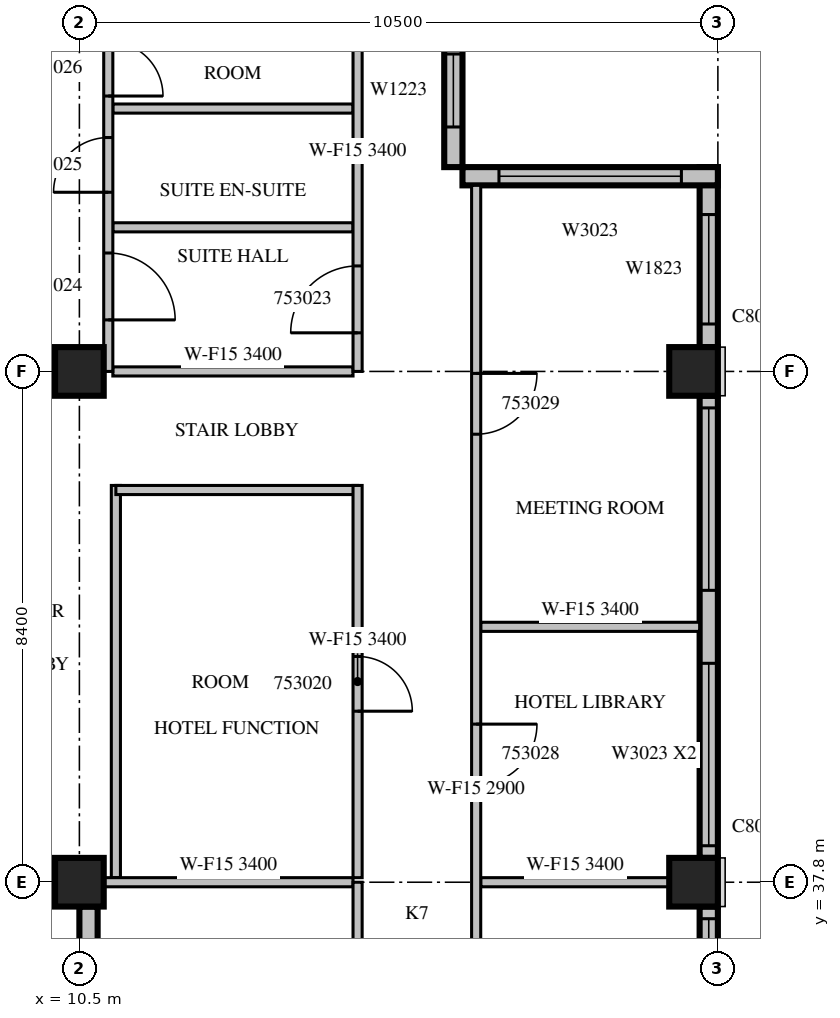
"""IFC4 building model, lengths in metres.
Left out: names, types, materials, properties, quantities, classifications, styles, units other than length and angle.
Written with IfcOpenShell. Run it as: python <this file> out.ifc"""

import sys

from ifc_helpers import new_model, si_unit, direction, frame, frame_2d, origin, origin_2d, place, context, subcontext, project, spatial, rectangle, extrude, source, transform, mapped, element, fill, save


model = new_model("IFC4")
c1 = context("Model", 3, precision=1e-05, world=origin(), true_north=direction((0.0, 1.0)))
c2 = subcontext(c1, "Body", "Model", "MODEL_VIEW")
j1 = project(units=[si_unit("LENGTHUNIT", "METRE"), si_unit("PLANEANGLEUNIT", "RADIAN")], contexts=[c1])
p1 = place(None, origin())
s1 = spatial("IfcSite", under=j1, at=p1, CompositionType="ELEMENT")
p2 = place(p1, origin())
s2 = spatial("IfcBuilding", under=s1, at=p2, CompositionType="ELEMENT")
p3 = place(p2, frame((0.0, 0.0, 234.8)))
s3 = spatial("IfcBuildingStorey", under=s2, at=p3, CompositionType="ELEMENT", Elevation=234.8)
m1 = source(origin(), c2, "Body", "SweptSolid", [
    extrude(rectangle(XDim=0.8, YDim=0.8, at=origin_2d()), origin(), (0.0, 0.0, 1.0), 3.8),
])
for number, where, z_axis, x_axis in (
    (1, (10.5, 37.8, 0.0), (0.0, 0.0, 1.0), (1.0, 0.0, 0.0)),
    (2, (20.6, 37.8, 0.0), (0.0, 0.0, 1.0), (1.0, 0.0, 0.0)),
    (3, (10.5, 46.2, 0.0), (0.0, 0.0, 1.0), (1.0, 0.0, 0.0)),
    (4, (20.6, 46.2, 0.0), (0.0, 0.0, 1.0), (1.0, 0.0, 0.0)),
):
    element("IfcColumn", number, at=place(p3, frame(where, z_axis=z_axis, x_axis=x_axis)), inside=s3, PredefinedType="COLUMN", context=c2, shape_type="MappedRepresentation", body=[
        mapped(m1, transform((0.0, 0.0, 0.0), scale=1.0)),
    ])
m2 = source(origin(), c2, "Body", "SweptSolid", [
    extrude(rectangle(XDim=7.6, YDim=0.3, at=frame_2d((3.8, 0.0))), origin(), (0.0, 0.0, 1.0), 2.9),
])
p4 = place(p3, frame((20.85, 29.8, 0.0), z_axis=(0.0, 0.0, 1.0), x_axis=(0.0, 1.0, 0.0)))
e5 = element("IfcWall", 5, at=p4, inside=s3, PredefinedType="STANDARD", context=c2, shape_type="MappedRepresentation", body=[
    mapped(m2, transform((0.0, 0.0, 0.0), scale=1.0)),
])
m3 = source(origin(), c2, "Body", "SweptSolid", [
    extrude(rectangle(XDim=3.0, YDim=2.3, at=frame_2d((1.5, 1.15))), frame((0.0, 0.16, 0.0), z_axis=(0.0, -1.0, 0.0), x_axis=(1.0, 0.0, 0.0)), (0.0, 0.0, 1.0), 0.32),
])
p5 = place(p4, frame((0.2, 0.0, 0.6)))
e6 = element("IfcOpeningElement", 6, at=p5, cuts=e5, PredefinedType="OPENING", context=c2, shape_type="MappedRepresentation", body=[
    mapped(m3, transform((0.0, 0.0, 0.0), scale=1.0)),
])
p6 = place(p4, frame((4.4, 0.0, 0.6)))
e7 = element("IfcOpeningElement", 7, at=p6, cuts=e5, PredefinedType="OPENING", context=c2, shape_type="MappedRepresentation", body=[
    mapped(m3, transform((0.0, 0.0, 0.0), scale=1.0)),
])
m4 = source(origin(), c2, "Body", "SweptSolid", [
    extrude(rectangle(XDim=7.6, YDim=0.3, at=frame_2d((3.8, 0.0))), origin(), (0.0, 0.0, 1.0), 3.4),
])
p7 = place(p3, frame((20.85, 38.2, 0.0), z_axis=(0.0, 0.0, 1.0), x_axis=(0.0, 1.0, 0.0)))
e8 = element("IfcWall", 8, at=p7, inside=s3, PredefinedType="STANDARD", context=c2, shape_type="MappedRepresentation", body=[
    mapped(m4, transform((0.0, 0.0, 0.0), scale=1.0)),
])
p8 = place(p7, frame((0.2, 0.0, 0.6)))
e9 = element("IfcOpeningElement", 9, at=p8, cuts=e8, PredefinedType="OPENING", context=c2, shape_type="MappedRepresentation", body=[
    mapped(m3, transform((0.0, 0.0, 0.0), scale=1.0)),
])
p9 = place(p7, frame((4.4, 0.0, 0.6)))
e10 = element("IfcOpeningElement", 10, at=p9, cuts=e8, PredefinedType="OPENING", context=c2, shape_type="MappedRepresentation", body=[
    mapped(m3, transform((0.0, 0.0, 0.0), scale=1.0)),
])
m5 = source(origin(), c2, "Body", "SweptSolid", [
    extrude(rectangle(XDim=2.96, YDim=0.3, at=frame_2d((1.48, 0.0))), origin(), (0.0, 0.0, 1.0), 3.4),
])
p10 = place(p3, frame((20.85, 46.6, 0.0), z_axis=(0.0, 0.0, 1.0), x_axis=(0.0, 1.0, 0.0)))
e11 = element("IfcWall", 11, at=p10, inside=s3, PredefinedType="STANDARD", context=c2, shape_type="MappedRepresentation", body=[
    mapped(m5, transform((0.0, 0.0, 0.0), scale=1.0)),
])
m6 = source(origin(), c2, "Body", "SweptSolid", [
    extrude(rectangle(XDim=1.8, YDim=2.3, at=frame_2d((0.9, 1.15))), frame((0.0, 0.16, 0.0), z_axis=(0.0, -1.0, 0.0), x_axis=(1.0, 0.0, 0.0)), (0.0, 0.0, 1.0), 0.32),
])
p11 = place(p10, frame((0.38, 0.0, 0.6)))
e12 = element("IfcOpeningElement", 12, at=p11, cuts=e11, PredefinedType="OPENING", context=c2, shape_type="MappedRepresentation", body=[
    mapped(m6, transform((0.0, 0.0, 0.0), scale=1.0)),
])
m7 = source(origin(), c2, "Body", "SweptSolid", [
    extrude(rectangle(XDim=4.2, YDim=0.3, at=frame_2d((2.1, 0.0))), origin(), (0.0, 0.0, 1.0), 3.4),
])
p12 = place(p3, frame((21.0, 49.41, 0.0), z_axis=(0.0, 0.0, 1.0), x_axis=(-1.0, 0.0, 0.0)))
e13 = element("IfcWall", 13, at=p12, inside=s3, PredefinedType="STANDARD", context=c2, shape_type="MappedRepresentation", body=[
    mapped(m7, transform((0.0, 0.0, 0.0), scale=1.0)),
])
p13 = place(p12, frame((0.6, 0.0, 0.6)))
e14 = element("IfcOpeningElement", 14, at=p13, cuts=e13, PredefinedType="OPENING", context=c2, shape_type="MappedRepresentation", body=[
    mapped(m3, transform((0.0, 0.0, 0.0), scale=1.0)),
])
m8 = source(origin(), c2, "Body", "SweptSolid", [
    extrude(rectangle(XDim=2.52, YDim=0.3, at=frame_2d((1.26, 0.0))), origin(), (0.0, 0.0, 1.0), 3.4),
])
p14 = place(p3, frame((16.65, 49.56, 0.0), z_axis=(0.0, 0.0, 1.0), x_axis=(0.0, 1.0, 0.0)))
e15 = element("IfcWall", 15, at=p14, inside=s3, PredefinedType="STANDARD", context=c2, shape_type="MappedRepresentation", body=[
    mapped(m8, transform((0.0, 0.0, 0.0), scale=1.0)),
])
m9 = source(origin(), c2, "Body", "SweptSolid", [
    extrude(rectangle(XDim=1.2, YDim=2.3, at=frame_2d((0.6, 1.15))), frame((0.0, 0.16, 0.0), z_axis=(0.0, -1.0, 0.0), x_axis=(1.0, 0.0, 0.0)), (0.0, 0.0, 1.0), 0.32),
])
p15 = place(p14, frame((0.66, 0.0, 0.6)))
e16 = element("IfcOpeningElement", 16, at=p15, cuts=e15, PredefinedType="OPENING", context=c2, shape_type="MappedRepresentation", body=[
    mapped(m9, transform((0.0, 0.0, 0.0), scale=1.0)),
])
m10 = source(origin(), c2, "Body", "SweptSolid", [
    extrude(rectangle(XDim=1.4, YDim=0.3, at=frame_2d((0.7, 0.0))), origin(), (0.0, 0.0, 1.0), 3.4),
])
p16 = place(p3, frame((8.7, 37.95, 0.0), z_axis=(0.0, 0.0, 1.0), x_axis=(1.0, 0.0, 0.0)))
e17 = element("IfcWall", 17, at=p16, inside=s3, PredefinedType="STANDARD", context=c2, shape_type="MappedRepresentation", body=[
    mapped(m10, transform((0.0, 0.0, 0.0), scale=1.0)),
])
p17 = place(p3, frame((10.65, 37.4, 0.0), z_axis=(0.0, 0.0, 1.0), x_axis=(0.0, -1.0, 0.0)))
e18 = element("IfcWall", 18, at=p17, inside=s3, PredefinedType="STANDARD", context=c2, shape_type="SweptSolid", body=[
    extrude(rectangle(XDim=7.6, YDim=0.3, at=frame_2d((3.8, 0.0))), origin(), (0.0, 0.0, 1.0), 2.4),
])
m11 = source(origin(), c2, "Body", "SweptSolid", [
    extrude(rectangle(XDim=6.45, YDim=0.15, at=frame_2d((3.225, 0.0))), origin(), (0.0, 0.0, 1.0), 3.4),
])
p18 = place(p3, frame((11.1, 44.325, 0.0), z_axis=(0.0, 0.0, 1.0), x_axis=(0.0, -1.0, 0.0)))
e19 = element("IfcWall", 19, at=p18, inside=s3, PredefinedType="PARTITIONING", context=c2, shape_type="MappedRepresentation", body=[
    mapped(m11, transform((0.0, 0.0, 0.0), scale=1.0)),
])
m12 = source(origin(), c2, "Body", "SweptSolid", [
    extrude(rectangle(XDim=3.975, YDim=0.15, at=frame_2d((1.988, 0.0))), origin(), (0.0, 0.0, 1.0), 3.4),
])
p19 = place(p3, frame((15.075, 44.25, 0.0), z_axis=(0.0, 0.0, 1.0), x_axis=(-1.0, 0.0, 0.0)))
e20 = element("IfcWall", 20, at=p19, inside=s3, PredefinedType="PARTITIONING", context=c2, shape_type="MappedRepresentation", body=[
    mapped(m12, transform((0.0, 0.0, 0.0), scale=1.0)),
])
p20 = place(p3, frame((15.075, 37.875, 0.0), z_axis=(0.0, 0.0, 1.0), x_axis=(0.0, 1.0, 0.0)))
e21 = element("IfcWall", 21, at=p20, inside=s3, PredefinedType="PARTITIONING", context=c2, shape_type="MappedRepresentation", body=[
    mapped(m11, transform((0.0, 0.0, 0.0), scale=1.0)),
])
m13 = source(origin(), c2, "Body", "SweptSolid", [
    extrude(rectangle(XDim=0.9, YDim=2.1, at=frame_2d((0.45, 1.05))), frame((0.0, 0.085, 0.0), z_axis=(0.0, -1.0, 0.0), x_axis=(1.0, 0.0, 0.0)), (0.0, 0.0, 1.0), 0.17),
])
p21 = place(p20, frame((2.737, 0.0, 0.0)))
e22 = element("IfcOpeningElement", 22, at=p21, cuts=e21, PredefinedType="OPENING", context=c2, shape_type="MappedRepresentation", body=[
    mapped(m13, transform((0.0, 0.0, 0.0), scale=1.0)),
])
m14 = source(origin(), c2, "Body", "SweptSolid", [
    extrude(rectangle(XDim=4.101, YDim=0.15, at=frame_2d((2.05, 0.0))), origin(), (0.0, 0.0, 1.0), 3.4),
])
p22 = place(p3, frame((15.0, 37.8, 0.0), z_axis=(0.0, 0.0, 1.0), x_axis=(-1.0, 0.0, 0.0)))
e23 = element("IfcWall", 23, at=p22, inside=s3, PredefinedType="PARTITIONING", context=c2, shape_type="MappedRepresentation", body=[
    mapped(m14, transform((0.0, 0.0, 0.0), scale=1.0)),
])
m15 = source(origin(), c2, "Body", "SweptSolid", [
    extrude(rectangle(XDim=3.95, YDim=0.15, at=frame_2d((1.975, 0.0))), origin(), (0.0, 0.0, 1.0), 3.4),
])
for number, where, z_axis, x_axis in (
    (24, (15.0, 48.57, 0.0), (0.0, 0.0, 1.0), (-1.0, 0.0, 0.0)),
    (25, (15.0, 50.523, 0.0), (0.0, 0.0, 1.0), (-1.0, 0.0, 0.0)),
):
    element("IfcWall", number, at=place(p3, frame(where, z_axis=z_axis, x_axis=x_axis)), inside=s3, PredefinedType="PARTITIONING", context=c2, shape_type="MappedRepresentation", body=[
        mapped(m15, transform((0.0, 0.0, 0.0), scale=1.0)),
    ])
m16 = source(origin(), c2, "Body", "SweptSolid", [
    extrude(rectangle(XDim=3.596, YDim=0.15, at=frame_2d((1.798, 0.0))), origin(), (0.0, 0.0, 1.0), 3.4),
])
p23 = place(p3, frame((10.101, 46.2, 0.0), z_axis=(0.0, 0.0, 1.0), x_axis=(-1.0, 0.0, 0.0)))
e26 = element("IfcWall", 26, at=p23, inside=s3, PredefinedType="PARTITIONING", context=c2, shape_type="MappedRepresentation", body=[
    mapped(m16, transform((0.0, 0.0, 0.0), scale=1.0)),
])
p24 = place(p3, frame((15.0, 46.2, 0.0), z_axis=(0.0, 0.0, 1.0), x_axis=(-1.0, 0.0, 0.0)))
e27 = element("IfcWall", 27, at=p24, inside=s3, PredefinedType="PARTITIONING", context=c2, shape_type="MappedRepresentation", body=[
    mapped(m15, transform((0.0, 0.0, 0.0), scale=1.0)),
])
m17 = source(origin(), c2, "Body", "SweptSolid", [
    extrude(rectangle(XDim=7.26, YDim=0.15, at=frame_2d((3.63, 0.0))), origin(), (0.0, 0.0, 1.0), 3.4),
])
p25 = place(p3, frame((10.975, 46.2, 0.0), z_axis=(0.0, 0.0, 1.0), x_axis=(0.0, 1.0, 0.0)))
e28 = element("IfcWall", 28, at=p25, inside=s3, PredefinedType="PARTITIONING", context=c2, shape_type="MappedRepresentation", body=[
    mapped(m17, transform((0.0, 0.0, 0.0), scale=1.0)),
])
m18 = source(origin(), c2, "Body", "SweptSolid", [
    extrude(rectangle(XDim=1.1, YDim=2.1, at=frame_2d((0.55, 1.05))), frame((0.0, 0.085, 0.0), z_axis=(0.0, -1.0, 0.0), x_axis=(1.0, 0.0, 0.0)), (0.0, 0.0, 1.0), 0.17),
])
p26 = place(p25, frame((0.847, 0.0, 0.0)))
e29 = element("IfcOpeningElement", 29, at=p26, cuts=e28, PredefinedType="OPENING", context=c2, shape_type="MappedRepresentation", body=[
    mapped(m18, transform((0.0, 0.0, 0.0), scale=1.0)),
])
p27 = place(p25, frame((2.946, 0.0, 0.0)))
e30 = element("IfcOpeningElement", 30, at=p27, cuts=e28, PredefinedType="OPENING", context=c2, shape_type="MappedRepresentation", body=[
    mapped(m13, transform((0.0, 0.0, 0.0), scale=1.0)),
])
p28 = place(p25, frame((4.529, 0.0, 0.0)))
e31 = element("IfcOpeningElement", 31, at=p28, cuts=e28, PredefinedType="OPENING", context=c2, shape_type="MappedRepresentation", body=[
    mapped(m13, transform((0.0, 0.0, 0.0), scale=1.0)),
])
m19 = source(origin(), c2, "Body", "SweptSolid", [
    extrude(rectangle(XDim=3.101, YDim=0.15, at=frame_2d((1.55, 0.0))), origin(), (0.0, 0.0, 1.0), 3.4),
])
p29 = place(p3, frame((20.201, 37.8, 0.0), z_axis=(0.0, 0.0, 1.0), x_axis=(-1.0, 0.0, 0.0)))
e32 = element("IfcWall", 32, at=p29, inside=s3, PredefinedType="PARTITIONING", context=c2, shape_type="MappedRepresentation", body=[
    mapped(m19, transform((0.0, 0.0, 0.0), scale=1.0)),
])
m20 = source(origin(), c2, "Body", "SweptSolid", [
    extrude(rectangle(XDim=3.6, YDim=0.15, at=frame_2d((1.8, 0.0))), origin(), (0.0, 0.0, 1.0), 3.4),
])
p30 = place(p3, frame((20.7, 42.0, 0.0), z_axis=(0.0, 0.0, 1.0), x_axis=(-1.0, 0.0, 0.0)))
e33 = element("IfcWall", 33, at=p30, inside=s3, PredefinedType="PARTITIONING", context=c2, shape_type="MappedRepresentation", body=[
    mapped(m20, transform((0.0, 0.0, 0.0), scale=1.0)),
])
m21 = source(origin(), c2, "Body", "SweptSolid", [
    extrude(rectangle(XDim=8.4, YDim=0.15, at=frame_2d((4.2, 0.0))), origin(), (0.0, 0.0, 1.0), 2.9),
])
p31 = place(p3, frame((15.075, 29.4, 0.0), z_axis=(0.0, 0.0, 1.0), x_axis=(0.0, 1.0, 0.0)))
e34 = element("IfcWall", 34, at=p31, inside=s3, PredefinedType="PARTITIONING", context=c2, shape_type="MappedRepresentation", body=[
    mapped(m21, transform((0.0, 0.0, 0.0), scale=1.0)),
])
p32 = place(p31, frame((0.638, 0.0, 0.0)))
e35 = element("IfcOpeningElement", 35, at=p32, cuts=e34, PredefinedType="OPENING", context=c2, shape_type="MappedRepresentation", body=[
    mapped(m18, transform((0.0, 0.0, 0.0), scale=1.0)),
])
p33 = place(p3, frame((15.075, 46.2, 0.0), z_axis=(0.0, 0.0, 1.0), x_axis=(0.0, 1.0, 0.0)))
e36 = element("IfcWall", 36, at=p33, inside=s3, PredefinedType="PARTITIONING", context=c2, shape_type="MappedRepresentation", body=[
    mapped(m17, transform((0.0, 0.0, 0.0), scale=1.0)),
])
p34 = place(p33, frame((0.635, 0.0, 0.0)))
e37 = element("IfcOpeningElement", 37, at=p34, cuts=e36, PredefinedType="OPENING", context=c2, shape_type="MappedRepresentation", body=[
    mapped(m18, transform((0.0, 0.0, 0.0), scale=1.0)),
])
m22 = source(origin(), c2, "Body", "SweptSolid", [
    extrude(rectangle(XDim=19.86, YDim=0.15, at=frame_2d((9.93, 0.0))), origin(), (0.0, 0.0, 1.0), 2.9),
])
p35 = place(p3, frame((17.025, 49.26, 0.0), z_axis=(0.0, 0.0, 1.0), x_axis=(0.0, -1.0, 0.0)))
e38 = element("IfcWall", 38, at=p35, inside=s3, PredefinedType="PARTITIONING", context=c2, shape_type="MappedRepresentation", body=[
    mapped(m22, transform((0.0, 0.0, 0.0), scale=1.0)),
])
m23 = source(origin(), c2, "Body", "SweptSolid", [
    extrude(rectangle(XDim=1.2, YDim=2.1, at=frame_2d((0.6, 1.05))), frame((0.0, 0.085, 0.0), z_axis=(0.0, -1.0, 0.0), x_axis=(1.0, 0.0, 0.0)), (0.0, 0.0, 1.0), 0.17),
])
p36 = place(p35, frame((15.06, 0.0, 0.0)))
e39 = element("IfcOpeningElement", 39, at=p36, cuts=e38, PredefinedType="OPENING", context=c2, shape_type="MappedRepresentation", body=[
    mapped(m23, transform((0.0, 0.0, 0.0), scale=1.0)),
])
m24 = source(origin(), c2, "Body", "SweptSolid", [
    extrude(rectangle(XDim=1.0, YDim=2.1, at=frame_2d((0.5, 1.05))), frame((0.0, 0.085, 0.0), z_axis=(0.0, -1.0, 0.0), x_axis=(1.0, 0.0, 0.0)), (0.0, 0.0, 1.0), 0.17),
])
p37 = place(p35, frame((8.86, 0.0, 0.0)))
e40 = element("IfcOpeningElement", 40, at=p37, cuts=e38, PredefinedType="OPENING", context=c2, shape_type="MappedRepresentation", body=[
    mapped(m24, transform((0.0, 0.0, 0.0), scale=1.0)),
])
p38 = place(p35, frame((3.092, 0.0, 0.0)))
e41 = element("IfcOpeningElement", 41, at=p38, cuts=e38, PredefinedType="OPENING", context=c2, shape_type="MappedRepresentation", body=[
    mapped(m24, transform((0.0, 0.0, 0.0), scale=1.0)),
])
m25 = source(origin(), c2, "Body", "SweptSolid", [
    extrude(rectangle(XDim=3.0, YDim=2.3, at=frame_2d((1.5, 1.15))), frame((0.0, 0.03, 0.0), z_axis=(0.0, -1.0, 0.0), x_axis=(1.0, 0.0, 0.0)), (0.0, 0.0, 1.0), 0.06),
])
p39 = place(p6, origin())
e42 = element("IfcWindow", 42, at=p39, inside=s3, PartitioningType="SINGLE_PANEL", PredefinedType="WINDOW", context=c2, shape_type="MappedRepresentation", body=[
    mapped(m25, transform((0.0, 0.0, 0.0), scale=1.0)),
])
fill(e7, e42)
p40 = place(p8, origin())
e43 = element("IfcWindow", 43, at=p40, inside=s3, PartitioningType="SINGLE_PANEL", PredefinedType="WINDOW", context=c2, shape_type="MappedRepresentation", body=[
    mapped(m25, transform((0.0, 0.0, 0.0), scale=1.0)),
])
fill(e9, e43)
p41 = place(p9, origin())
e44 = element("IfcWindow", 44, at=p41, inside=s3, PartitioningType="SINGLE_PANEL", PredefinedType="WINDOW", context=c2, shape_type="MappedRepresentation", body=[
    mapped(m25, transform((0.0, 0.0, 0.0), scale=1.0)),
])
fill(e10, e44)
m26 = source(origin(), c2, "Body", "SweptSolid", [
    extrude(rectangle(XDim=1.8, YDim=2.3, at=frame_2d((0.9, 1.15))), frame((0.0, 0.03, 0.0), z_axis=(0.0, -1.0, 0.0), x_axis=(1.0, 0.0, 0.0)), (0.0, 0.0, 1.0), 0.06),
])
p42 = place(p11, origin())
e45 = element("IfcWindow", 45, at=p42, inside=s3, PartitioningType="SINGLE_PANEL", PredefinedType="WINDOW", context=c2, shape_type="MappedRepresentation", body=[
    mapped(m26, transform((0.0, 0.0, 0.0), scale=1.0)),
])
fill(e12, e45)
p43 = place(p13, origin())
e46 = element("IfcWindow", 46, at=p43, inside=s3, PartitioningType="SINGLE_PANEL", PredefinedType="WINDOW", context=c2, shape_type="MappedRepresentation", body=[
    mapped(m25, transform((0.0, 0.0, 0.0), scale=1.0)),
])
fill(e14, e46)
m27 = source(origin(), c2, "Body", "SweptSolid", [
    extrude(rectangle(XDim=1.2, YDim=2.3, at=frame_2d((0.6, 1.15))), frame((0.0, 0.03, 0.0), z_axis=(0.0, -1.0, 0.0), x_axis=(1.0, 0.0, 0.0)), (0.0, 0.0, 1.0), 0.06),
])
p44 = place(p15, origin())
e47 = element("IfcWindow", 47, at=p44, inside=s3, PartitioningType="SINGLE_PANEL", PredefinedType="WINDOW", context=c2, shape_type="MappedRepresentation", body=[
    mapped(m27, transform((0.0, 0.0, 0.0), scale=1.0)),
])
fill(e16, e47)
m28 = source(origin(), c2, "Body", "SweptSolid", [
    extrude(rectangle(XDim=0.9, YDim=2.1, at=frame_2d((0.45, 1.05))), frame((0.0, 0.025, 0.0), z_axis=(0.0, -1.0, 0.0), x_axis=(1.0, 0.0, 0.0)), (0.0, 0.0, 1.0), 0.05),
])
p45 = place(p21, origin())
e48 = element("IfcDoor", 48, at=p45, inside=s3, OperationType="SINGLE_SWING_RIGHT", PredefinedType="DOOR", context=c2, shape_type="MappedRepresentation", body=[
    mapped(m28, transform((0.0, 0.0, 0.0), scale=1.0)),
])
fill(e22, e48)
m29 = source(origin(), c2, "Body", "SweptSolid", [
    extrude(rectangle(XDim=1.1, YDim=2.1, at=frame_2d((0.55, 1.05))), frame((0.0, 0.025, 0.0), z_axis=(0.0, -1.0, 0.0), x_axis=(1.0, 0.0, 0.0)), (0.0, 0.0, 1.0), 0.05),
])
p46 = place(p34, origin())
e49 = element("IfcDoor", 49, at=p46, inside=s3, OperationType="SINGLE_SWING_LEFT", PredefinedType="DOOR", context=c2, shape_type="MappedRepresentation", body=[
    mapped(m29, transform((0.0, 0.0, 0.0), scale=1.0)),
])
fill(e37, e49)
p47 = place(p26, origin())
e50 = element("IfcDoor", 50, at=p47, inside=s3, OperationType="SINGLE_SWING_RIGHT", PredefinedType="DOOR", context=c2, shape_type="MappedRepresentation", body=[
    mapped(m29, transform((0.0, 0.0, 0.0), scale=1.0)),
])
fill(e29, e50)
p48 = place(p27, origin())
e51 = element("IfcDoor", 51, at=p48, inside=s3, OperationType="SINGLE_SWING_LEFT", PredefinedType="DOOR", context=c2, shape_type="MappedRepresentation", body=[
    mapped(m28, transform((0.0, 0.0, 0.0), scale=1.0)),
])
fill(e30, e51)
p49 = place(p28, origin())
e52 = element("IfcDoor", 52, at=p49, inside=s3, OperationType="SINGLE_SWING_RIGHT", PredefinedType="DOOR", context=c2, shape_type="MappedRepresentation", body=[
    mapped(m28, transform((0.0, 0.0, 0.0), scale=1.0)),
])
fill(e31, e52)
m30 = source(origin(), c2, "Body", "SweptSolid", [
    extrude(rectangle(XDim=1.0, YDim=2.1, at=frame_2d((0.5, 1.05))), frame((0.0, 0.025, 0.0), z_axis=(0.0, -1.0, 0.0), x_axis=(1.0, 0.0, 0.0)), (0.0, 0.0, 1.0), 0.05),
])
p50 = place(p37, origin())
e53 = element("IfcDoor", 53, at=p50, inside=s3, OperationType="SINGLE_SWING_LEFT", PredefinedType="DOOR", context=c2, shape_type="MappedRepresentation", body=[
    mapped(m30, transform((0.0, 0.0, 0.0), scale=1.0)),
])
fill(e40, e53)
p51 = place(p38, origin())
e54 = element("IfcDoor", 54, at=p51, inside=s3, OperationType="SINGLE_SWING_LEFT", PredefinedType="DOOR", context=c2, shape_type="MappedRepresentation", body=[
    mapped(m30, transform((0.0, 0.0, 0.0), scale=1.0)),
])
fill(e41, e54)
save(model, sys.argv[1])
